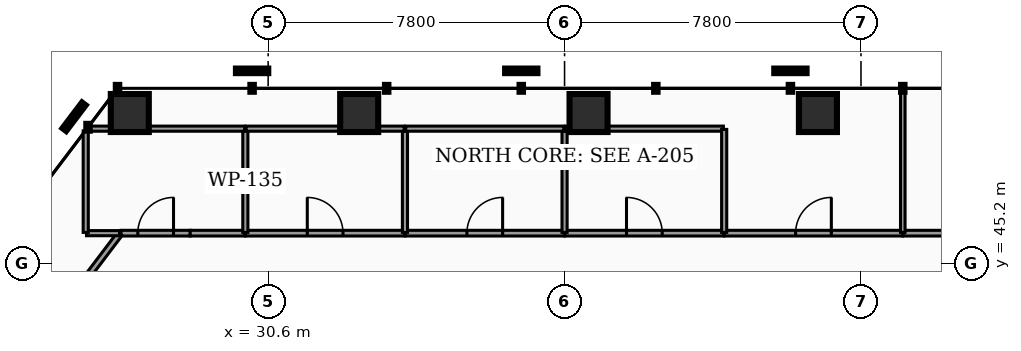
"""IFC4 building model, lengths in metres.
Left out: names, types, materials, properties, quantities, classifications, styles, units other than length and angle.
Written with IfcOpenShell. Run it as: python <this file> out.ifc"""

import sys

from ifc_helpers import new_model, si_unit, direction, frame, frame_2d, origin, origin_2d, place, context, subcontext, project, spatial, rectangle, hollow_rectangle, extrude, element, fill, save


model = new_model("IFC4")
c1 = context("Model", 3, precision=1e-05, world=origin(), true_north=direction((0.0, 1.0)))
c2 = subcontext(c1, "Body", "Model", "MODEL_VIEW")
j1 = project(units=[si_unit("LENGTHUNIT", "METRE"), si_unit("PLANEANGLEUNIT", "RADIAN")], contexts=[c1])
p1 = place(None, origin())
s1 = spatial("IfcSite", under=j1, at=p1, CompositionType="ELEMENT")
p2 = place(p1, origin())
s2 = spatial("IfcBuilding", under=s1, at=p2, CompositionType="ELEMENT")
p3 = place(p2, frame((0.0, 0.0, 64.26)))
s3 = spatial("IfcBuildingStorey", under=s2, at=p3, CompositionType="ELEMENT", Elevation=64.26)
for number, where, z_axis, x_axis in (
    (1, (45.067, 49.161, 0.0), (0.0, 0.0, 1.0), (1.0, 0.0, 0.0)),
    (2, (39.031, 49.161, 0.0), (0.0, 0.0, 1.0), (1.0, 0.0, 0.0)),
    (3, (32.995, 49.161, 0.0), (0.0, 0.0, 1.0), (1.0, 0.0, 0.0)),
    (4, (26.96, 49.161, 0.0), (0.0, 0.0, 1.0), (1.0, 0.0, 0.0)),
):
    element("IfcColumn", number, at=place(p3, frame(where, z_axis=z_axis, x_axis=x_axis)), inside=s3, PredefinedType="COLUMN", context=c2, shape_type="SweptSolid", body=[
        extrude(hollow_rectangle(XDim=1.0, YDim=1.0, WallThickness=0.05, at=origin_2d()), origin(), (0.0, 0.0, 1.0), 3.82),
    ])
p4 = place(p3, frame((26.73, 46.0, 0.0), z_axis=(0.0, 0.0, 1.0), x_axis=(1.0, 0.0, 0.0)))
e5 = element("IfcWall", 5, at=p4, inside=s3, PredefinedType="PARTITIONING", context=c2, shape_type="SweptSolid", body=[
    extrude(rectangle(XDim=1.82, YDim=0.15, at=frame_2d((0.91, 0.0))), origin(), (0.0, 0.0, 1.0), 2.777),
])
p5 = place(p4, frame((0.44, 0.0, 0.0)))
e6 = element("IfcOpeningElement", 6, at=p5, cuts=e5, PredefinedType="OPENING", context=c2, shape_type="SweptSolid", body=[
    extrude(rectangle(XDim=0.94, YDim=2.05, at=frame_2d((0.47, 1.025))), frame((0.0, 0.085, 0.0), z_axis=(0.0, -1.0, 0.0), x_axis=(1.0, 0.0, 0.0)), (0.0, 0.0, 1.0), 0.17),
])
p6 = place(p3, frame((28.55, 46.0, 0.0), z_axis=(0.0, 0.0, 1.0), x_axis=(1.0, 0.0, 0.0)))
e7 = element("IfcWall", 7, at=p6, inside=s3, PredefinedType="PARTITIONING", context=c2, shape_type="SweptSolid", body=[
    extrude(rectangle(XDim=1.445, YDim=0.15, at=frame_2d((0.723, 0.0))), origin(), (0.0, 0.0, 1.0), 2.777),
])
p7 = place(p3, frame((30.005, 46.0, 0.0), z_axis=(0.0, 0.0, 1.0), x_axis=(1.0, 0.0, 0.0)))
e8 = element("IfcWall", 8, at=p7, inside=s3, PredefinedType="PARTITIONING", context=c2, shape_type="SweptSolid", body=[
    extrude(rectangle(XDim=4.19, YDim=0.15, at=frame_2d((2.095, 0.0))), origin(), (0.0, 0.0, 1.0), 2.777),
])
p8 = place(p7, frame((1.625, 0.0, 0.0)))
e9 = element("IfcOpeningElement", 9, at=p8, cuts=e8, PredefinedType="OPENING", context=c2, shape_type="SweptSolid", body=[
    extrude(rectangle(XDim=0.94, YDim=2.05, at=frame_2d((0.47, 1.025))), frame((0.0, 0.085, 0.0), z_axis=(0.0, -1.0, 0.0), x_axis=(1.0, 0.0, 0.0)), (0.0, 0.0, 1.0), 0.17),
])
p9 = place(p3, frame((34.205, 46.0, 0.0), z_axis=(0.0, 0.0, 1.0), x_axis=(1.0, 0.0, 0.0)))
e10 = element("IfcWall", 10, at=p9, inside=s3, PredefinedType="PARTITIONING", context=c2, shape_type="SweptSolid", body=[
    extrude(rectangle(XDim=4.19, YDim=0.15, at=frame_2d((2.095, 0.0))), origin(), (0.0, 0.0, 1.0), 2.777),
])
p10 = place(p9, frame((1.625, 0.0, 0.0)))
e11 = element("IfcOpeningElement", 11, at=p10, cuts=e10, PredefinedType="OPENING", context=c2, shape_type="SweptSolid", body=[
    extrude(rectangle(XDim=0.94, YDim=2.05, at=frame_2d((0.47, 1.025))), frame((0.0, 0.085, 0.0), z_axis=(0.0, -1.0, 0.0), x_axis=(1.0, 0.0, 0.0)), (0.0, 0.0, 1.0), 0.17),
])
p11 = place(p3, frame((38.405, 46.0, 0.0), z_axis=(0.0, 0.0, 1.0), x_axis=(1.0, 0.0, 0.0)))
e12 = element("IfcWall", 12, at=p11, inside=s3, PredefinedType="PARTITIONING", context=c2, shape_type="SweptSolid", body=[
    extrude(rectangle(XDim=4.19, YDim=0.15, at=frame_2d((2.095, 0.0))), origin(), (0.0, 0.0, 1.0), 2.777),
])
p12 = place(p11, frame((1.625, 0.0, 0.0)))
e13 = element("IfcOpeningElement", 13, at=p12, cuts=e12, PredefinedType="OPENING", context=c2, shape_type="SweptSolid", body=[
    extrude(rectangle(XDim=0.94, YDim=2.05, at=frame_2d((0.47, 1.025))), frame((0.0, 0.085, 0.0), z_axis=(0.0, -1.0, 0.0), x_axis=(1.0, 0.0, 0.0)), (0.0, 0.0, 1.0), 0.17),
])
p13 = place(p3, frame((25.45, 44.337, 0.0), z_axis=(0.0, 0.0, 1.0), x_axis=(0.603848590911, 0.797099039803, 0.0)))
e14 = element("IfcWall", 14, at=p13, inside=s3, PredefinedType="PARTITIONING", context=c2, shape_type="SweptSolid", body=[
    extrude(rectangle(XDim=2.067, YDim=0.15, at=frame_2d((1.033, 0.0))), origin(), (0.0, 0.0, 1.0), 2.777),
])
p14 = place(p3, frame((47.305, 46.0, 0.0), z_axis=(0.0, 0.0, 1.0), x_axis=(1.0, 0.0, 0.0)))
e15 = element("IfcWall", 15, at=p14, inside=s3, PredefinedType="PARTITIONING", context=c2, shape_type="SweptSolid", body=[
    extrude(rectangle(XDim=1.045, YDim=0.15, at=frame_2d((0.522, 0.0))), origin(), (0.0, 0.0, 1.0), 2.777),
])
p15 = place(p3, frame((42.605, 46.0, 0.0), z_axis=(0.0, 0.0, 1.0), x_axis=(1.0, 0.0, 0.0)))
e16 = element("IfcWall", 16, at=p15, inside=s3, PredefinedType="PARTITIONING", context=c2, shape_type="SweptSolid", body=[
    extrude(rectangle(XDim=4.69, YDim=0.15, at=frame_2d((2.345, 0.0))), origin(), (0.0, 0.0, 1.0), 2.777),
])
p16 = place(p15, frame((1.875, 0.0, 0.0)))
e17 = element("IfcOpeningElement", 17, at=p16, cuts=e16, PredefinedType="OPENING", context=c2, shape_type="SweptSolid", body=[
    extrude(rectangle(XDim=0.94, YDim=2.05, at=frame_2d((0.47, 1.025))), frame((0.0, 0.085, 0.0), z_axis=(0.0, -1.0, 0.0), x_axis=(1.0, 0.0, 0.0)), (0.0, 0.0, 1.0), 0.17),
])
p17 = place(p3, frame((30.0, 46.02, 0.0), z_axis=(0.0, 0.0, 1.0), x_axis=(0.0, 1.0, 0.0)))
e18 = element("IfcWall", 18, at=p17, inside=s3, PredefinedType="PARTITIONING", context=c2, shape_type="SweptSolid", body=[
    extrude(rectangle(XDim=2.71, YDim=0.135, at=frame_2d((1.355, 0.0))), origin(), (0.0, 0.0, 1.0), 2.777),
])
p18 = place(p3, frame((25.82, 46.0, 0.0), z_axis=(0.0, 0.0, 1.0), x_axis=(1.0, 0.0, 0.0)))
e19 = element("IfcWall", 19, at=p18, inside=s3, PredefinedType="PARTITIONING", context=c2, shape_type="SweptSolid", body=[
    extrude(rectangle(XDim=0.87, YDim=0.135, at=frame_2d((0.435, 0.0))), origin(), (0.0, 0.0, 1.0), 2.777),
])
p19 = place(p3, frame((25.8, 46.02, 0.0), z_axis=(0.0, 0.0, 1.0), x_axis=(0.0, 1.0, 0.0)))
e20 = element("IfcWall", 20, at=p19, inside=s3, PredefinedType="PARTITIONING", context=c2, shape_type="SweptSolid", body=[
    extrude(rectangle(XDim=2.672, YDim=0.135, at=frame_2d((1.336, 0.0))), origin(), (0.0, 0.0, 1.0), 2.777),
])
p20 = place(p3, frame((25.848, 48.75, 0.0), z_axis=(0.0, 0.0, 1.0), x_axis=(1.0, 0.0, 0.0)))
e21 = element("IfcWall", 21, at=p20, inside=s3, PredefinedType="PARTITIONING", context=c2, shape_type="SweptSolid", body=[
    extrude(rectangle(XDim=4.132, YDim=0.135, at=frame_2d((2.066, 0.0))), origin(), (0.0, 0.0, 1.0), 2.777),
])
p21 = place(p3, frame((34.2, 46.02, 0.0), z_axis=(0.0, 0.0, 1.0), x_axis=(0.0, 1.0, 0.0)))
e22 = element("IfcWall", 22, at=p21, inside=s3, PredefinedType="PARTITIONING", context=c2, shape_type="SweptSolid", body=[
    extrude(rectangle(XDim=2.71, YDim=0.135, at=frame_2d((1.355, 0.0))), origin(), (0.0, 0.0, 1.0), 2.777),
])
p22 = place(p3, frame((30.02, 48.75, 0.0), z_axis=(0.0, 0.0, 1.0), x_axis=(1.0, 0.0, 0.0)))
e23 = element("IfcWall", 23, at=p22, inside=s3, PredefinedType="PARTITIONING", context=c2, shape_type="SweptSolid", body=[
    extrude(rectangle(XDim=4.16, YDim=0.135, at=frame_2d((2.08, 0.0))), origin(), (0.0, 0.0, 1.0), 2.777),
])
p23 = place(p3, frame((38.4, 46.02, 0.0), z_axis=(0.0, 0.0, 1.0), x_axis=(0.0, 1.0, 0.0)))
e24 = element("IfcWall", 24, at=p23, inside=s3, PredefinedType="PARTITIONING", context=c2, shape_type="SweptSolid", body=[
    extrude(rectangle(XDim=2.71, YDim=0.135, at=frame_2d((1.355, 0.0))), origin(), (0.0, 0.0, 1.0), 2.777),
])
p24 = place(p3, frame((34.22, 48.75, 0.0), z_axis=(0.0, 0.0, 1.0), x_axis=(1.0, 0.0, 0.0)))
e25 = element("IfcWall", 25, at=p24, inside=s3, PredefinedType="PARTITIONING", context=c2, shape_type="SweptSolid", body=[
    extrude(rectangle(XDim=4.16, YDim=0.135, at=frame_2d((2.08, 0.0))), origin(), (0.0, 0.0, 1.0), 2.777),
])
p25 = place(p3, frame((38.42, 48.75, 0.0), z_axis=(0.0, 0.0, 1.0), x_axis=(1.0, 0.0, 0.0)))
e26 = element("IfcWall", 26, at=p25, inside=s3, PredefinedType="PARTITIONING", context=c2, shape_type="SweptSolid", body=[
    extrude(rectangle(XDim=4.16, YDim=0.135, at=frame_2d((2.08, 0.0))), origin(), (0.0, 0.0, 1.0), 2.777),
])
p26 = place(p3, frame((42.6, 46.02, 0.0), z_axis=(0.0, 0.0, 1.0), x_axis=(0.0, 1.0, 0.0)))
e27 = element("IfcWall", 27, at=p26, inside=s3, PredefinedType="PARTITIONING", context=c2, shape_type="SweptSolid", body=[
    extrude(rectangle(XDim=2.71, YDim=0.135, at=frame_2d((1.355, 0.0))), origin(), (0.0, 0.0, 1.0), 2.777),
])
p27 = place(p3, frame((47.3, 46.02, 0.0), z_axis=(0.0, 0.0, 1.0), x_axis=(0.0, 1.0, 0.0)))
e28 = element("IfcWall", 28, at=p27, inside=s3, PredefinedType="PARTITIONING", context=c2, shape_type="SweptSolid", body=[
    extrude(rectangle(XDim=3.776, YDim=0.12, at=frame_2d((1.888, 0.0))), origin(), (0.0, 0.0, 1.0), 2.777),
])
p28 = place(p5, origin())
e29 = element("IfcDoor", 29, at=p28, inside=s3, OperationType="SINGLE_SWING_RIGHT", PredefinedType="DOOR", context=c2, shape_type="SweptSolid", body=[
    extrude(rectangle(XDim=0.94, YDim=2.05, at=frame_2d((0.47, 1.025))), frame((0.0, 0.025, 0.0), z_axis=(0.0, -1.0, 0.0), x_axis=(1.0, 0.0, 0.0)), (0.0, 0.0, 1.0), 0.05),
])
fill(e6, e29)
p29 = place(p8, origin())
e30 = element("IfcDoor", 30, at=p29, inside=s3, OperationType="SINGLE_SWING_LEFT", PredefinedType="DOOR", context=c2, shape_type="SweptSolid", body=[
    extrude(rectangle(XDim=0.94, YDim=2.05, at=frame_2d((0.47, 1.025))), frame((0.0, 0.025, 0.0), z_axis=(0.0, -1.0, 0.0), x_axis=(1.0, 0.0, 0.0)), (0.0, 0.0, 1.0), 0.05),
])
fill(e9, e30)
p30 = place(p10, origin())
e31 = element("IfcDoor", 31, at=p30, inside=s3, OperationType="SINGLE_SWING_RIGHT", PredefinedType="DOOR", context=c2, shape_type="SweptSolid", body=[
    extrude(rectangle(XDim=0.94, YDim=2.05, at=frame_2d((0.47, 1.025))), frame((0.0, 0.025, 0.0), z_axis=(0.0, -1.0, 0.0), x_axis=(1.0, 0.0, 0.0)), (0.0, 0.0, 1.0), 0.05),
])
fill(e11, e31)
p31 = place(p12, origin())
e32 = element("IfcDoor", 32, at=p31, inside=s3, OperationType="SINGLE_SWING_LEFT", PredefinedType="DOOR", context=c2, shape_type="SweptSolid", body=[
    extrude(rectangle(XDim=0.94, YDim=2.05, at=frame_2d((0.47, 1.025))), frame((0.0, 0.025, 0.0), z_axis=(0.0, -1.0, 0.0), x_axis=(1.0, 0.0, 0.0)), (0.0, 0.0, 1.0), 0.05),
])
fill(e13, e32)
p32 = place(p16, origin())
e33 = element("IfcDoor", 33, at=p32, inside=s3, OperationType="SINGLE_SWING_RIGHT", PredefinedType="DOOR", context=c2, shape_type="SweptSolid", body=[
    extrude(rectangle(XDim=0.94, YDim=2.05, at=frame_2d((0.47, 1.025))), frame((0.0, 0.025, 0.0), z_axis=(0.0, -1.0, 0.0), x_axis=(1.0, 0.0, 0.0)), (0.0, 0.0, 1.0), 0.05),
])
fill(e17, e33)
save(model, sys.argv[1])
